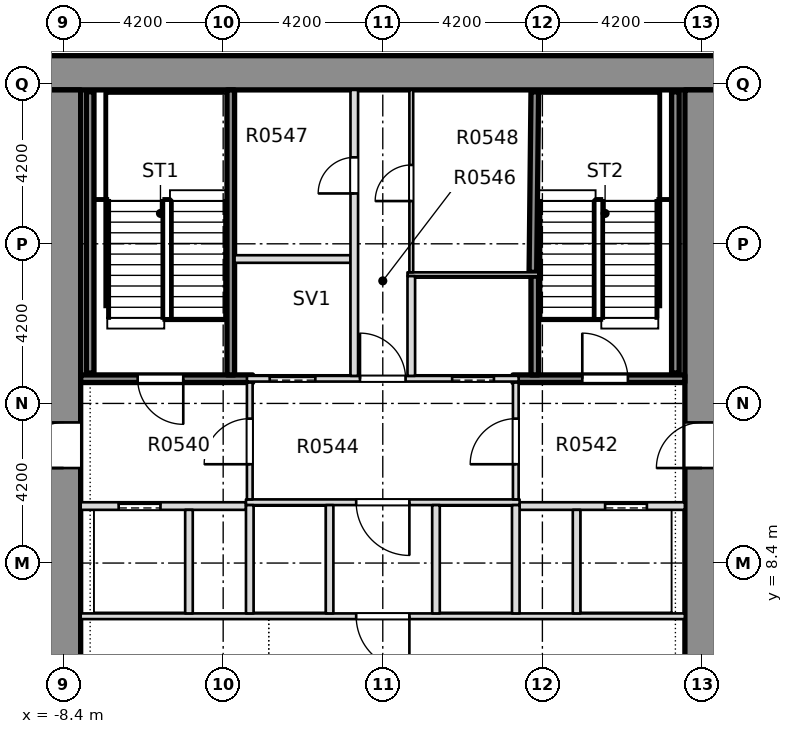
"""IFC4 building model, lengths in metres.
Left out: names, types, materials, properties, quantities, classifications, styles, units other than length and angle.
Written with IfcOpenShell. Run it as: python <this file> out.ifc"""

import sys

from ifc_helpers import new_model, si_unit, direction, frame, frame_2d, origin, place, context, subcontext, project, spatial, rectangle, extrude, element, fill, save


model = new_model("IFC4")
c1 = context("Model", 3, precision=1e-05, world=origin(), true_north=direction((0.0, 1.0)))
c2 = subcontext(c1, "Body", "Model", "MODEL_VIEW")
j1 = project(units=[si_unit("LENGTHUNIT", "METRE"), si_unit("PLANEANGLEUNIT", "RADIAN")], contexts=[c1])
p1 = place(None, origin())
s1 = spatial("IfcSite", under=j1, at=p1, CompositionType="ELEMENT")
p2 = place(p1, origin())
s2 = spatial("IfcBuilding", under=s1, at=p2, CompositionType="ELEMENT")
p3 = place(p2, frame((0.0, 0.0, 30.0)))
s3 = spatial("IfcBuildingStorey", under=s2, at=p3, CompositionType="ELEMENT", Elevation=30.0)
p4 = place(p3, frame((-11.7, 21.3, -0.4), z_axis=(0.0, 0.0, 1.0), x_axis=(1.0, 0.0, 0.0)))
e1 = element("IfcWall", 1, at=p4, inside=s3, PredefinedType="SOLIDWALL", context=c2, shape_type="SweptSolid", body=[
    extrude(rectangle(XDim=23.4, YDim=0.9, at=frame_2d((11.7, 0.0))), origin(), (0.0, 0.0, 1.0), 4.58),
])
p5 = place(p3, frame((-8.4, -7.5, -0.4), z_axis=(0.0, 0.0, 1.0), x_axis=(0.0, 1.0, 0.0)))
e2 = element("IfcWall", 2, at=p5, inside=s3, PredefinedType="SHEAR", context=c2, shape_type="SweptSolid", body=[
    extrude(rectangle(XDim=28.35, YDim=0.9, at=frame_2d((14.175, 0.0))), origin(), (0.0, 0.0, 1.0), 4.58),
])
p6 = place(p5, frame((18.4, 0.0, 0.4)))
e3 = element("IfcOpeningElement", 3, at=p6, cuts=e2, PredefinedType="OPENING", context=c2, shape_type="SweptSolid", body=[
    extrude(rectangle(XDim=1.2, YDim=2.1, at=frame_2d((0.6, 1.05))), frame((0.0, 0.46, 0.0), z_axis=(0.0, -1.0, 0.0), x_axis=(1.0, 0.0, 0.0)), (0.0, 0.0, 1.0), 0.92),
])
p7 = place(p3, frame((8.4, -7.5, -0.4), z_axis=(0.0, 0.0, 1.0), x_axis=(0.0, 1.0, 0.0)))
e4 = element("IfcWall", 4, at=p7, inside=s3, PredefinedType="SHEAR", context=c2, shape_type="SweptSolid", body=[
    extrude(rectangle(XDim=28.35, YDim=0.9, at=frame_2d((14.175, 0.0))), origin(), (0.0, 0.0, 1.0), 4.58),
])
p8 = place(p7, frame((18.4, 0.0, 0.4)))
e5 = element("IfcOpeningElement", 5, at=p8, cuts=e4, PredefinedType="OPENING", context=c2, shape_type="SweptSolid", body=[
    extrude(rectangle(XDim=1.2, YDim=2.1, at=frame_2d((0.6, 1.05))), frame((0.0, 0.46, 0.0), z_axis=(0.0, -1.0, 0.0), x_axis=(1.0, 0.0, 0.0)), (0.0, 0.0, 1.0), 0.92),
])
p9 = place(p3, frame((-7.949, 7.0, 0.0), z_axis=(0.0, 0.0, 1.0), x_axis=(1.0, 0.0, 0.0)))
e6 = element("IfcWall", 6, at=p9, inside=s3, PredefinedType="PARTITIONING", context=c2, shape_type="SweptSolid", body=[
    extrude(rectangle(XDim=15.898, YDim=0.15, at=frame_2d((7.949, 0.0))), origin(), (0.0, 0.0, 1.0), 4.18),
])
p10 = place(p9, frame((7.249, 0.0, 0.0)))
e7 = element("IfcOpeningElement", 7, at=p10, cuts=e6, PredefinedType="OPENING", context=c2, shape_type="SweptSolid", body=[
    extrude(rectangle(XDim=1.4, YDim=2.1, at=frame_2d((0.7, 1.05))), frame((0.0, 0.085, 0.0), z_axis=(0.0, -1.0, 0.0), x_axis=(1.0, 0.0, 0.0)), (0.0, 0.0, 1.0), 0.17),
])
p11 = place(p3, frame((-7.949, 9.9, 0.0), z_axis=(0.0, 0.0, 1.0), x_axis=(1.0, 0.0, 0.0)))
e8 = element("IfcWall", 8, at=p11, inside=s3, PredefinedType="PARTITIONING", context=c2, shape_type="SweptSolid", body=[
    extrude(rectangle(XDim=4.349, YDim=0.2, at=frame_2d((2.174, 0.0))), origin(), (0.0, 0.0, 1.0), 4.18),
])
p12 = place(p11, frame((0.999, 0.0, 0.0)))
e9 = element("IfcOpeningElement", 9, at=p12, cuts=e8, PredefinedType="OPENING", context=c2, shape_type="SweptSolid", body=[
    extrude(rectangle(XDim=1.1, YDim=2.1, at=frame_2d((0.55, 1.05))), frame((0.0, 0.11, 0.0), z_axis=(0.0, -1.0, 0.0), x_axis=(1.0, 0.0, 0.0)), (0.0, 0.0, 1.0), 0.22),
])
p13 = place(p3, frame((3.6, 9.9, 0.0), z_axis=(0.0, 0.0, 1.0), x_axis=(1.0, 0.0, 0.0)))
e10 = element("IfcWall", 10, at=p13, inside=s3, PredefinedType="PARTITIONING", context=c2, shape_type="SweptSolid", body=[
    extrude(rectangle(XDim=4.349, YDim=0.2, at=frame_2d((2.174, 0.0))), origin(), (0.0, 0.0, 1.0), 4.18),
])
p14 = place(p13, frame((2.25, 0.0, 0.0)))
e11 = element("IfcOpeningElement", 11, at=p14, cuts=e10, PredefinedType="OPENING", context=c2, shape_type="SweptSolid", body=[
    extrude(rectangle(XDim=1.1, YDim=2.1, at=frame_2d((0.55, 1.05))), frame((0.0, 0.11, 0.0), z_axis=(0.0, -1.0, 0.0), x_axis=(1.0, 0.0, 0.0)), (0.0, 0.0, 1.0), 0.22),
])
p15 = place(p3, frame((-3.6, 10.0, 0.0), z_axis=(0.0, 0.0, 1.0), x_axis=(1.0, 0.0, 0.0)))
e12 = element("IfcWall", 12, at=p15, inside=s3, PredefinedType="PARTITIONING", context=c2, shape_type="SweptSolid", body=[
    extrude(rectangle(XDim=7.2, YDim=0.15, at=frame_2d((3.6, 0.0))), origin(), (0.0, 0.0, 1.0), 4.18),
])
p16 = place(p15, frame((2.9, 0.0, 0.0)))
e13 = element("IfcOpeningElement", 13, at=p16, cuts=e12, PredefinedType="OPENING", context=c2, shape_type="SweptSolid", body=[
    extrude(rectangle(XDim=1.4, YDim=2.1, at=frame_2d((0.7, 1.05))), frame((0.0, 0.085, 0.0), z_axis=(0.0, -1.0, 0.0), x_axis=(1.0, 0.0, 0.0)), (0.0, 0.0, 1.0), 0.17),
])
p17 = place(p3, frame((-7.949, 13.25, 0.0), z_axis=(0.0, 0.0, 1.0), x_axis=(1.0, 0.0, 0.0)))
e14 = element("IfcWall", 14, at=p17, inside=s3, PredefinedType="SOLIDWALL", context=c2, shape_type="SweptSolid", body=[
    extrude(rectangle(XDim=4.524, YDim=0.2, at=frame_2d((2.262, 0.0))), origin(), (0.0, 0.0, 1.0), 4.18),
])
p18 = place(p17, frame((1.499, 0.0, 0.0)))
e15 = element("IfcOpeningElement", 15, at=p18, cuts=e14, PredefinedType="OPENING", context=c2, shape_type="SweptSolid", body=[
    extrude(rectangle(XDim=1.2, YDim=2.1, at=frame_2d((0.6, 1.05))), frame((0.0, 0.11, 0.0), z_axis=(0.0, -1.0, 0.0), x_axis=(1.0, 0.0, 0.0)), (0.0, 0.0, 1.0), 0.22),
])
p19 = place(p3, frame((-3.575, 13.25, 0.0), z_axis=(0.0, 0.0, 1.0), x_axis=(1.0, 0.0, 0.0)))
e16 = element("IfcWall", 16, at=p19, inside=s3, PredefinedType="PARTITIONING", context=c2, shape_type="SweptSolid", body=[
    extrude(rectangle(XDim=7.15, YDim=0.15, at=frame_2d((3.575, 0.0))), origin(), (0.0, 0.0, 1.0), 4.18),
])
p20 = place(p19, frame((0.6, 0.0, 0.0)))
e17 = element("IfcOpeningElement", 17, at=p20, cuts=e16, PredefinedType="OPENING", context=c2, shape_type="SweptSolid", body=[
    extrude(rectangle(XDim=1.2, YDim=2.1, at=frame_2d((0.6, 1.05))), frame((0.0, 0.085, 0.0), z_axis=(0.0, -1.0, 0.0), x_axis=(1.0, 0.0, 0.0)), (0.0, 0.0, 1.0), 0.17),
])
p21 = place(p19, frame((5.4, 0.0, 0.0)))
e18 = element("IfcOpeningElement", 18, at=p21, cuts=e16, PredefinedType="OPENING", context=c2, shape_type="SweptSolid", body=[
    extrude(rectangle(XDim=1.1, YDim=2.1, at=frame_2d((0.55, 1.05))), frame((0.0, 0.085, 0.0), z_axis=(0.0, -1.0, 0.0), x_axis=(1.0, 0.0, 0.0)), (0.0, 0.0, 1.0), 0.17),
])
p22 = place(p19, frame((2.975, 0.0, 0.0)))
e19 = element("IfcOpeningElement", 19, at=p22, cuts=e16, PredefinedType="OPENING", context=c2, shape_type="SweptSolid", body=[
    extrude(rectangle(XDim=1.2, YDim=2.1, at=frame_2d((0.6, 1.05))), frame((0.0, 0.085, 0.0), z_axis=(0.0, -1.0, 0.0), x_axis=(1.0, 0.0, 0.0)), (0.0, 0.0, 1.0), 0.17),
])
p23 = place(p3, frame((3.425, 13.25, 0.0), z_axis=(0.0, 0.0, 1.0), x_axis=(1.0, 0.0, 0.0)))
e20 = element("IfcWall", 20, at=p23, inside=s3, PredefinedType="SOLIDWALL", context=c2, shape_type="SweptSolid", body=[
    extrude(rectangle(XDim=4.524, YDim=0.2, at=frame_2d((2.262, 0.0))), origin(), (0.0, 0.0, 1.0), 4.18),
])
p24 = place(p23, frame((1.825, 0.0, 0.0)))
e21 = element("IfcOpeningElement", 21, at=p24, cuts=e20, PredefinedType="OPENING", context=c2, shape_type="SweptSolid", body=[
    extrude(rectangle(XDim=1.2, YDim=2.1, at=frame_2d((0.6, 1.05))), frame((0.0, 0.11, 0.0), z_axis=(0.0, -1.0, 0.0), x_axis=(1.0, 0.0, 0.0)), (0.0, 0.0, 1.0), 0.22),
])
p25 = place(p3, frame((0.65, 16.0, 0.0), z_axis=(0.0, 0.0, 1.0), x_axis=(1.0, 0.0, 0.0)))
e22 = element("IfcWall", 22, at=p25, inside=s3, PredefinedType="PARTITIONING", context=c2, shape_type="SweptSolid", body=[
    extrude(rectangle(XDim=3.45, YDim=0.1, at=frame_2d((1.725, 0.0))), origin(), (0.0, 0.0, 1.0), 4.18),
])
p26 = place(p3, frame((-3.9, 16.4, 0.0), z_axis=(0.0, 0.0, 1.0), x_axis=(1.0, 0.0, 0.0)))
e23 = element("IfcWall", 23, at=p26, inside=s3, PredefinedType="PARTITIONING", context=c2, shape_type="SweptSolid", body=[
    extrude(rectangle(XDim=3.05, YDim=0.2, at=frame_2d((1.525, 0.0))), origin(), (0.0, 0.0, 1.0), 4.18),
])
p27 = place(p3, frame((-5.1, 7.075, 0.0), z_axis=(0.0, 0.0, 1.0), x_axis=(0.0, 1.0, 0.0)))
e24 = element("IfcWall", 24, at=p27, inside=s3, PredefinedType="PARTITIONING", context=c2, shape_type="SweptSolid", body=[
    extrude(rectangle(XDim=2.725, YDim=0.2, at=frame_2d((1.363, 0.0))), origin(), (0.0, 0.0, 1.0), 4.18),
])
p28 = place(p3, frame((-4.0, 13.35, 0.0), z_axis=(0.0, 0.0, 1.0), x_axis=(0.0, 1.0, 0.0)))
e25 = element("IfcWall", 25, at=p28, inside=s3, PredefinedType="SOLIDWALL", context=c2, shape_type="SweptSolid", body=[
    extrude(rectangle(XDim=7.499, YDim=0.2, at=frame_2d((3.75, 0.0))), origin(), (0.0, 0.0, 1.0), 4.18),
])
p29 = place(p3, frame((-3.5, 7.075, 0.0), z_axis=(0.0, 0.0, 1.0), x_axis=(0.0, 1.0, 0.0)))
e26 = element("IfcWall", 26, at=p29, inside=s3, PredefinedType="PARTITIONING", context=c2, shape_type="SweptSolid", body=[
    extrude(rectangle(XDim=2.85, YDim=0.2, at=frame_2d((1.425, 0.0))), origin(), (0.0, 0.0, 1.0), 4.18),
])
p30 = place(p3, frame((-3.5, 10.075, 0.0), z_axis=(0.0, 0.0, 1.0), x_axis=(0.0, 1.0, 0.0)))
e27 = element("IfcWall", 27, at=p30, inside=s3, PredefinedType="PARTITIONING", context=c2, shape_type="SweptSolid", body=[
    extrude(rectangle(XDim=3.075, YDim=0.15, at=frame_2d((1.538, 0.0))), origin(), (0.0, 0.0, 1.0), 4.18),
])
p31 = place(p30, frame((0.925, 0.0, 0.0)))
e28 = element("IfcOpeningElement", 28, at=p31, cuts=e27, PredefinedType="OPENING", context=c2, shape_type="SweptSolid", body=[
    extrude(rectangle(XDim=1.2, YDim=2.1, at=frame_2d((0.6, 1.05))), frame((0.0, 0.085, 0.0), z_axis=(0.0, -1.0, 0.0), x_axis=(1.0, 0.0, 0.0)), (0.0, 0.0, 1.0), 0.17),
])
p32 = place(p3, frame((-1.4, 7.075, 0.0), z_axis=(0.0, 0.0, 1.0), x_axis=(0.0, 1.0, 0.0)))
e29 = element("IfcWall", 29, at=p32, inside=s3, PredefinedType="PARTITIONING", context=c2, shape_type="SweptSolid", body=[
    extrude(rectangle(XDim=2.85, YDim=0.2, at=frame_2d((1.425, 0.0))), origin(), (0.0, 0.0, 1.0), 4.18),
])
p33 = place(p3, frame((-0.75, 13.325, 0.0), z_axis=(0.0, 0.0, 1.0), x_axis=(0.0, 1.0, 0.0)))
e30 = element("IfcWall", 30, at=p33, inside=s3, PredefinedType="PARTITIONING", context=c2, shape_type="SweptSolid", body=[
    extrude(rectangle(XDim=7.524, YDim=0.2, at=frame_2d((3.762, 0.0))), origin(), (0.0, 0.0, 1.0), 4.18),
])
p34 = place(p33, frame((4.8, 0.0, 0.0)))
e31 = element("IfcOpeningElement", 31, at=p34, cuts=e30, PredefinedType="OPENING", context=c2, shape_type="SweptSolid", body=[
    extrude(rectangle(XDim=0.95, YDim=2.1, at=frame_2d((0.475, 1.05))), frame((0.0, 0.11, 0.0), z_axis=(0.0, -1.0, 0.0), x_axis=(1.0, 0.0, 0.0)), (0.0, 0.0, 1.0), 0.22),
])
p35 = place(p3, frame((0.75, 13.325, 0.0), z_axis=(0.0, 0.0, 1.0), x_axis=(0.0, 1.0, 0.0)))
e32 = element("IfcWall", 32, at=p35, inside=s3, PredefinedType="PARTITIONING", context=c2, shape_type="SweptSolid", body=[
    extrude(rectangle(XDim=2.625, YDim=0.2, at=frame_2d((1.312, 0.0))), origin(), (0.0, 0.0, 1.0), 4.18),
])
p36 = place(p3, frame((0.75, 16.05, 0.0), z_axis=(0.0, 0.0, 1.0), x_axis=(0.0, 1.0, 0.0)))
e33 = element("IfcWall", 33, at=p36, inside=s3, PredefinedType="PARTITIONING", context=c2, shape_type="SweptSolid", body=[
    extrude(rectangle(XDim=4.799, YDim=0.1, at=frame_2d((2.399, 0.0))), origin(), (0.0, 0.0, 1.0), 4.18),
])
p37 = place(p36, frame((1.875, 0.0, 0.0)))
e34 = element("IfcOpeningElement", 34, at=p37, cuts=e33, PredefinedType="OPENING", context=c2, shape_type="SweptSolid", body=[
    extrude(rectangle(XDim=0.95, YDim=2.1, at=frame_2d((0.475, 1.05))), frame((0.0, 0.06, 0.0), z_axis=(0.0, -1.0, 0.0), x_axis=(1.0, 0.0, 0.0)), (0.0, 0.0, 1.0), 0.12),
])
for number, where, z_axis, x_axis in (
    (35, (1.4, 7.075, 0.0), (0.0, 0.0, 1.0), (0.0, 1.0, 0.0)),
    (36, (3.5, 7.075, 0.0), (0.0, 0.0, 1.0), (0.0, 1.0, 0.0)),
):
    element("IfcWall", number, at=place(p3, frame(where, z_axis=z_axis, x_axis=x_axis)), inside=s3, PredefinedType="PARTITIONING", context=c2, shape_type="SweptSolid", body=[
        extrude(rectangle(XDim=2.85, YDim=0.2, at=frame_2d((1.425, 0.0))), origin(), (0.0, 0.0, 1.0), 4.18),
    ])
p38 = place(p3, frame((3.5, 10.075, 0.0), z_axis=(0.0, 0.0, 1.0), x_axis=(0.0, 1.0, 0.0)))
e37 = element("IfcWall", 37, at=p38, inside=s3, PredefinedType="PARTITIONING", context=c2, shape_type="SweptSolid", body=[
    extrude(rectangle(XDim=3.075, YDim=0.15, at=frame_2d((1.538, 0.0))), origin(), (0.0, 0.0, 1.0), 4.18),
])
p39 = place(p38, frame((0.925, 0.0, 0.0)))
e38 = element("IfcOpeningElement", 38, at=p39, cuts=e37, PredefinedType="OPENING", context=c2, shape_type="SweptSolid", body=[
    extrude(rectangle(XDim=1.2, YDim=2.1, at=frame_2d((0.6, 1.05))), frame((0.0, 0.085, 0.0), z_axis=(0.0, -1.0, 0.0), x_axis=(1.0, 0.0, 0.0)), (0.0, 0.0, 1.0), 0.17),
])
p40 = place(p3, frame((4.0, 13.35, 0.0), z_axis=(0.0, 0.0, 1.0), x_axis=(0.0, 1.0, 0.0)))
e39 = element("IfcWall", 39, at=p40, inside=s3, PredefinedType="SOLIDWALL", context=c2, shape_type="SweptSolid", body=[
    extrude(rectangle(XDim=2.6, YDim=0.2, at=frame_2d((1.3, 0.0))), origin(), (0.0, 0.0, 1.0), 4.18),
])
p41 = place(p3, frame((3.95, 16.05, 0.0), z_axis=(0.0, 0.0, 1.0), x_axis=(0.010538176883, 0.999944471872, 0.0)))
e40 = element("IfcWall", 40, at=p41, inside=s3, PredefinedType="SOLIDWALL", context=c2, shape_type="SweptSolid", body=[
    extrude(rectangle(XDim=4.749, YDim=0.2, at=frame_2d((2.375, 0.0))), origin(), (0.0, 0.0, 1.0), 4.18),
])
p42 = place(p3, frame((5.1, 7.075, 0.0), z_axis=(0.0, 0.0, 1.0), x_axis=(0.0, 1.0, 0.0)))
e41 = element("IfcWall", 41, at=p42, inside=s3, PredefinedType="PARTITIONING", context=c2, shape_type="SweptSolid", body=[
    extrude(rectangle(XDim=2.725, YDim=0.2, at=frame_2d((1.363, 0.0))), origin(), (0.0, 0.0, 1.0), 4.18),
])
for number, where, z_axis, x_axis in (
    (42, (-7.7, 13.4, 0.0), (0.0, 0.0, 1.0), (0.0, 1.0, 0.0)),
    (43, (7.7, 13.4, 0.0), (0.0, 0.0, 1.0), (0.0, 1.0, 0.0)),
):
    element("IfcWall", number, at=place(p3, frame(where, z_axis=z_axis, x_axis=x_axis)), inside=s3, PredefinedType="SOLIDWALL", context=c2, shape_type="SweptSolid", body=[
        extrude(rectangle(XDim=7.4, YDim=0.2, at=frame_2d((3.7, 0.0))), origin(), (0.0, 0.0, 1.0), 4.18),
    ])
p43 = place(p18, origin())
e44 = element("IfcDoor", 44, at=p43, inside=s3, OperationType="SINGLE_SWING_LEFT", PredefinedType="DOOR", context=c2, shape_type="SweptSolid", body=[
    extrude(rectangle(XDim=1.2, YDim=2.1, at=frame_2d((0.6, 1.05))), frame((0.0, 0.025, 0.0), z_axis=(0.0, -1.0, 0.0), x_axis=(1.0, 0.0, 0.0)), (0.0, 0.0, 1.0), 0.05),
])
fill(e15, e44)
p44 = place(p12, origin())
e45 = element("IfcDoor", 45, at=p44, inside=s3, OperationType="SLIDING_TO_RIGHT", PredefinedType="DOOR", context=c2, shape_type="SweptSolid", body=[
    extrude(rectangle(XDim=1.1, YDim=2.1, at=frame_2d((0.55, 1.05))), frame((0.0, 0.025, 0.0), z_axis=(0.0, -1.0, 0.0), x_axis=(1.0, 0.0, 0.0)), (0.0, 0.0, 1.0), 0.05),
])
fill(e9, e45)
p45 = place(p24, origin())
e46 = element("IfcDoor", 46, at=p45, inside=s3, OperationType="SINGLE_SWING_RIGHT", PredefinedType="DOOR", context=c2, shape_type="SweptSolid", body=[
    extrude(rectangle(XDim=1.2, YDim=2.1, at=frame_2d((0.6, 1.05))), frame((0.0, 0.025, 0.0), z_axis=(0.0, -1.0, 0.0), x_axis=(1.0, 0.0, 0.0)), (0.0, 0.0, 1.0), 0.05),
])
fill(e21, e46)
p46 = place(p14, origin())
e47 = element("IfcDoor", 47, at=p46, inside=s3, OperationType="SLIDING_TO_LEFT", PredefinedType="DOOR", context=c2, shape_type="SweptSolid", body=[
    extrude(rectangle(XDim=1.1, YDim=2.1, at=frame_2d((0.55, 1.05))), frame((0.0, 0.025, 0.0), z_axis=(0.0, -1.0, 0.0), x_axis=(1.0, 0.0, 0.0)), (0.0, 0.0, 1.0), 0.05),
])
fill(e11, e47)
p47 = place(p10, origin())
e48 = element("IfcDoor", 48, at=p47, inside=s3, OperationType="SINGLE_SWING_RIGHT", PredefinedType="DOOR", context=c2, shape_type="SweptSolid", body=[
    extrude(rectangle(XDim=1.4, YDim=2.1, at=frame_2d((0.7, 1.05))), frame((0.0, 0.025, 0.0), z_axis=(0.0, -1.0, 0.0), x_axis=(1.0, 0.0, 0.0)), (0.0, 0.0, 1.0), 0.05),
])
fill(e7, e48)
p48 = place(p16, origin())
e49 = element("IfcDoor", 49, at=p48, inside=s3, OperationType="SINGLE_SWING_RIGHT", PredefinedType="DOOR", context=c2, shape_type="SweptSolid", body=[
    extrude(rectangle(XDim=1.4, YDim=2.1, at=frame_2d((0.7, 1.05))), frame((0.0, 0.025, 0.0), z_axis=(0.0, -1.0, 0.0), x_axis=(1.0, 0.0, 0.0)), (0.0, 0.0, 1.0), 0.05),
])
fill(e13, e49)
p49 = place(p20, origin())
e50 = element("IfcDoor", 50, at=p49, inside=s3, OperationType="SLIDING_TO_RIGHT", PredefinedType="DOOR", context=c2, shape_type="SweptSolid", body=[
    extrude(rectangle(XDim=1.2, YDim=2.1, at=frame_2d((0.6, 1.05))), frame((0.0, 0.025, 0.0), z_axis=(0.0, -1.0, 0.0), x_axis=(1.0, 0.0, 0.0)), (0.0, 0.0, 1.0), 0.05),
])
fill(e17, e50)
p50 = place(p21, origin())
e51 = element("IfcDoor", 51, at=p50, inside=s3, OperationType="SLIDING_TO_LEFT", PredefinedType="DOOR", context=c2, shape_type="SweptSolid", body=[
    extrude(rectangle(XDim=1.1, YDim=2.1, at=frame_2d((0.55, 1.05))), frame((0.0, 0.025, 0.0), z_axis=(0.0, -1.0, 0.0), x_axis=(1.0, 0.0, 0.0)), (0.0, 0.0, 1.0), 0.05),
])
fill(e18, e51)
p51 = place(p22, origin())
e52 = element("IfcDoor", 52, at=p51, inside=s3, OperationType="SINGLE_SWING_RIGHT", PredefinedType="DOOR", context=c2, shape_type="SweptSolid", body=[
    extrude(rectangle(XDim=1.2, YDim=2.1, at=frame_2d((0.6, 1.05))), frame((0.0, 0.025, 0.0), z_axis=(0.0, -1.0, 0.0), x_axis=(1.0, 0.0, 0.0)), (0.0, 0.0, 1.0), 0.05),
])
fill(e19, e52)
p52 = place(p34, origin())
e53 = element("IfcDoor", 53, at=p52, inside=s3, OperationType="SINGLE_SWING_RIGHT", PredefinedType="DOOR", context=c2, shape_type="SweptSolid", body=[
    extrude(rectangle(XDim=0.95, YDim=2.1, at=frame_2d((0.475, 1.05))), frame((0.0, 0.025, 0.0), z_axis=(0.0, -1.0, 0.0), x_axis=(1.0, 0.0, 0.0)), (0.0, 0.0, 1.0), 0.05),
])
fill(e31, e53)
p53 = place(p37, origin())
e54 = element("IfcDoor", 54, at=p53, inside=s3, OperationType="SINGLE_SWING_LEFT", PredefinedType="DOOR", context=c2, shape_type="SweptSolid", body=[
    extrude(rectangle(XDim=0.95, YDim=2.1, at=frame_2d((0.475, 1.05))), frame((0.0, 0.025, 0.0), z_axis=(0.0, -1.0, 0.0), x_axis=(1.0, 0.0, 0.0)), (0.0, 0.0, 1.0), 0.05),
])
fill(e34, e54)
p54 = place(p31, origin())
e55 = element("IfcDoor", 55, at=p54, inside=s3, OperationType="SINGLE_SWING_RIGHT", PredefinedType="DOOR", context=c2, shape_type="SweptSolid", body=[
    extrude(rectangle(XDim=1.2, YDim=2.1, at=frame_2d((0.6, 1.05))), frame((0.0, 0.025, 0.0), z_axis=(0.0, -1.0, 0.0), x_axis=(1.0, 0.0, 0.0)), (0.0, 0.0, 1.0), 0.05),
])
fill(e28, e55)
p55 = place(p39, origin())
e56 = element("IfcDoor", 56, at=p55, inside=s3, OperationType="SINGLE_SWING_LEFT", PredefinedType="DOOR", context=c2, shape_type="SweptSolid", body=[
    extrude(rectangle(XDim=1.2, YDim=2.1, at=frame_2d((0.6, 1.05))), frame((0.0, 0.025, 0.0), z_axis=(0.0, -1.0, 0.0), x_axis=(1.0, 0.0, 0.0)), (0.0, 0.0, 1.0), 0.05),
])
fill(e38, e56)
p56 = place(p6, origin())
e57 = element("IfcDoor", 57, at=p56, inside=s3, OperationType="SINGLE_SWING_LEFT", PredefinedType="DOOR", context=c2, shape_type="SweptSolid", body=[
    extrude(rectangle(XDim=1.2, YDim=2.1, at=frame_2d((0.6, 1.05))), frame((0.0, 0.025, 0.0), z_axis=(0.0, -1.0, 0.0), x_axis=(1.0, 0.0, 0.0)), (0.0, 0.0, 1.0), 0.05),
])
fill(e3, e57)
p57 = place(p8, origin())
e58 = element("IfcDoor", 58, at=p57, inside=s3, OperationType="SINGLE_SWING_LEFT", PredefinedType="DOOR", context=c2, shape_type="SweptSolid", body=[
    extrude(rectangle(XDim=1.2, YDim=2.1, at=frame_2d((0.6, 1.05))), frame((0.0, 0.025, 0.0), z_axis=(0.0, -1.0, 0.0), x_axis=(1.0, 0.0, 0.0)), (0.0, 0.0, 1.0), 0.05),
])
fill(e5, e58)
save(model, sys.argv[1])
